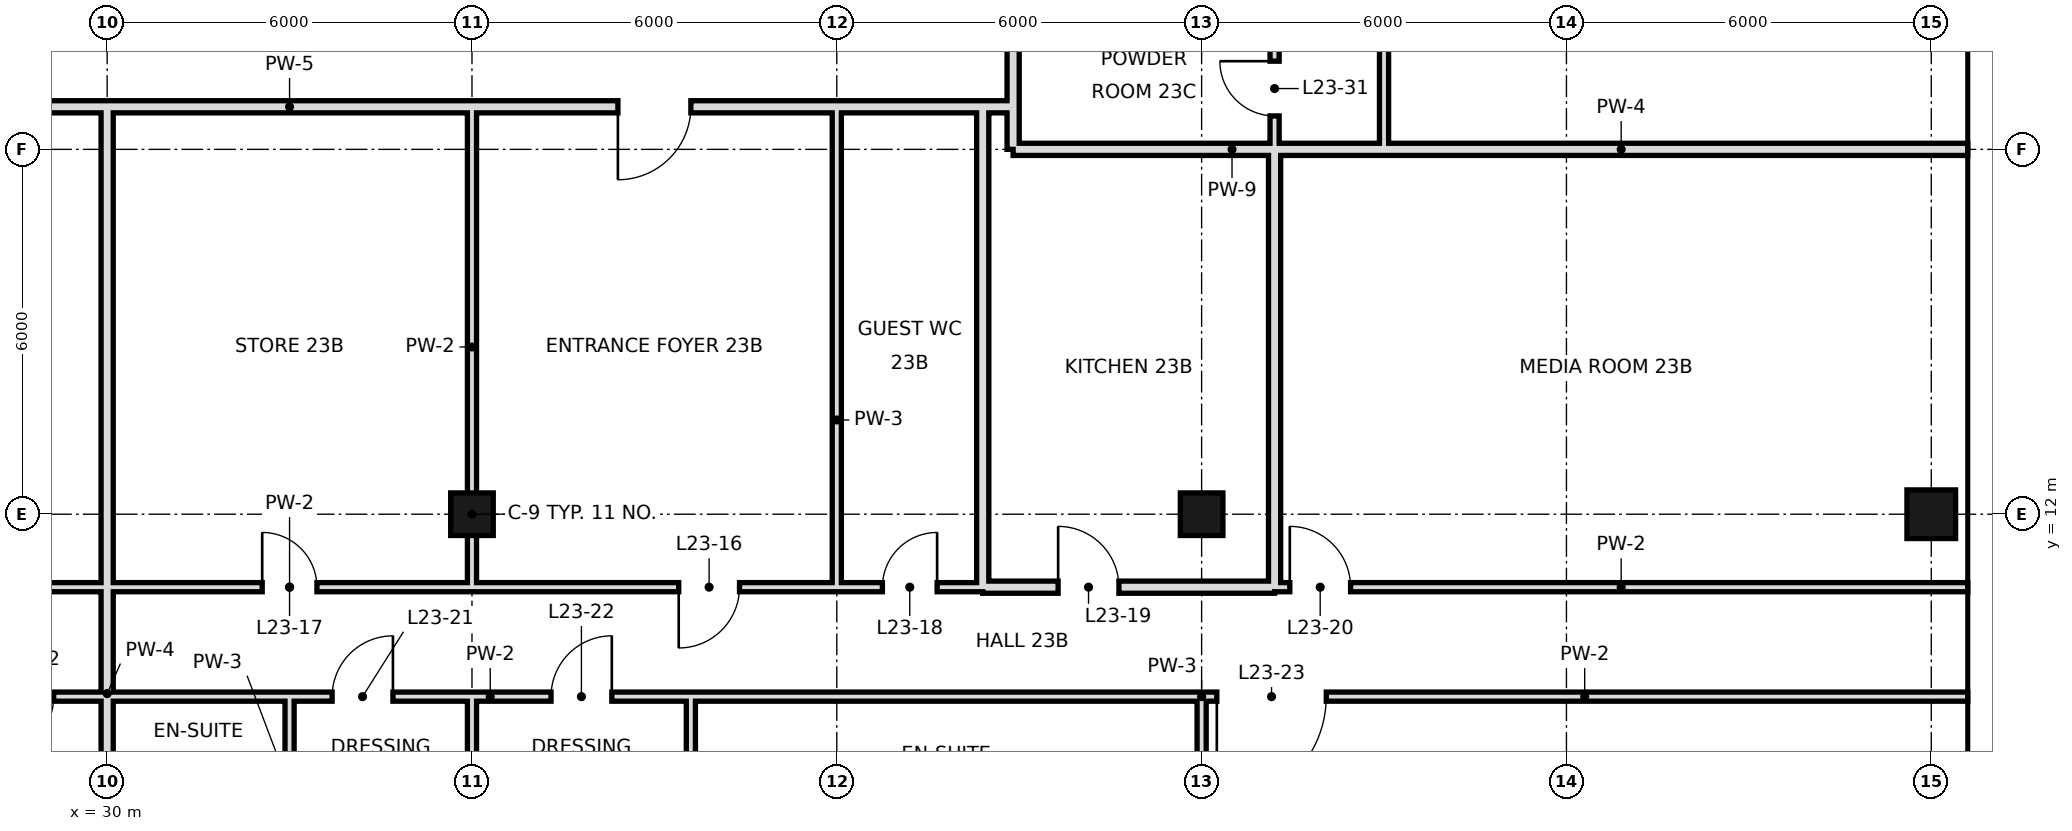
"""IFC4 building model, lengths in metres.
Left out: names, types, materials, properties, quantities, classifications, styles, units other than length and angle.
Written with IfcOpenShell. Run it as: python <this file> out.ifc"""

import sys

from ifc_helpers import new_model, si_unit, direction, frame, frame_2d, origin, origin_2d, place, context, subcontext, project, spatial, rectangle, hollow_rectangle, extrude, element, fill, save


model = new_model("IFC4")
c1 = context("Model", 3, precision=1e-05, world=origin(), true_north=direction((0.0, 1.0)))
c2 = subcontext(c1, "Body", "Model", "MODEL_VIEW")
j1 = project(units=[si_unit("LENGTHUNIT", "METRE"), si_unit("PLANEANGLEUNIT", "RADIAN")], contexts=[c1])
p1 = place(None, origin())
s1 = spatial("IfcSite", under=j1, at=p1, CompositionType="ELEMENT")
p2 = place(p1, origin())
s2 = spatial("IfcBuilding", under=s1, at=p2, CompositionType="ELEMENT")
p3 = place(p2, frame((0.0, 0.0, 107.0)))
s3 = spatial("IfcBuildingStorey", under=s2, at=p3, CompositionType="ELEMENT", Elevation=107.0)
for number, where, z_axis, x_axis in (
    (1, (36.0, 12.0, 0.0), (0.0, 0.0, 1.0), (1.0, 0.0, 0.0)),
    (2, (48.0, 12.0, 0.0), (0.0, 0.0, 1.0), (1.0, 0.0, 0.0)),
):
    element("IfcColumn", number, at=place(p3, frame(where, z_axis=z_axis, x_axis=x_axis)), inside=s3, PredefinedType="COLUMN", context=c2, shape_type="SweptSolid", body=[
        extrude(hollow_rectangle(XDim=0.7, YDim=0.7, WallThickness=0.036, at=origin_2d()), origin(), (0.0, 0.0, 1.0), 3.6),
    ])
p4 = place(p3, frame((60.0, 12.0, 0.0), z_axis=(0.0, 0.0, 1.0), x_axis=(1.0, 0.0, 0.0)))
e3 = element("IfcColumn", 3, at=p4, inside=s3, PredefinedType="COLUMN", context=c2, shape_type="SweptSolid", body=[
    extrude(hollow_rectangle(XDim=0.8, YDim=0.8, WallThickness=0.04, at=origin_2d()), origin(), (0.0, 0.0, 1.0), 3.6),
])
p5 = place(p3, frame((30.0, -0.6, 0.0), z_axis=(0.0, 0.0, 1.0), x_axis=(0.0, 1.0, 0.0)))
e4 = element("IfcWall", 4, at=p5, inside=s3, PredefinedType="SOLIDWALL", context=c2, shape_type="SweptSolid", body=[
    extrude(rectangle(XDim=19.3, YDim=0.2, at=frame_2d((9.65, 0.0))), origin(), (0.0, 0.0, 1.0), 2.72),
])
p6 = place(p3, frame((33.0, 6.0, 0.0), z_axis=(0.0, 0.0, 1.0), x_axis=(0.0, 1.0, 0.0)))
e5 = element("IfcWall", 5, at=p6, inside=s3, PredefinedType="PARTITIONING", context=c2, shape_type="SweptSolid", body=[
    extrude(rectangle(XDim=3.0, YDim=0.15, at=frame_2d((1.5, 0.0))), origin(), (0.0, 0.0, 1.0), 3.42),
])
p7 = place(p3, frame((36.0, 0.0, 0.0), z_axis=(0.0, 0.0, 1.0), x_axis=(0.0, 1.0, 0.0)))
e6 = element("IfcWall", 6, at=p7, inside=s3, PredefinedType="PARTITIONING", context=c2, shape_type="SweptSolid", body=[
    extrude(rectangle(XDim=9.0, YDim=0.15, at=frame_2d((4.5, 0.0))), origin(), (0.0, 0.0, 1.0), 2.72),
])
p8 = place(p3, frame((36.0, 10.8, 0.0), z_axis=(0.0, 0.0, 1.0), x_axis=(0.0, 1.0, 0.0)))
e7 = element("IfcWall", 7, at=p8, inside=s3, PredefinedType="PARTITIONING", context=c2, shape_type="SweptSolid", body=[
    extrude(rectangle(XDim=7.9, YDim=0.15, at=frame_2d((3.95, 0.0))), origin(), (0.0, 0.0, 1.0), 2.72),
])
p9 = place(p3, frame((39.6, 6.0, 0.0), z_axis=(0.0, 0.0, 1.0), x_axis=(0.0, 1.0, 0.0)))
e8 = element("IfcWall", 8, at=p9, inside=s3, PredefinedType="PARTITIONING", context=c2, shape_type="SweptSolid", body=[
    extrude(rectangle(XDim=3.0, YDim=0.15, at=frame_2d((1.5, 0.0))), origin(), (0.0, 0.0, 1.0), 3.42),
])
p10 = place(p3, frame((42.0, 10.8, 0.0), z_axis=(0.0, 0.0, 1.0), x_axis=(0.0, 1.0, 0.0)))
e9 = element("IfcWall", 9, at=p10, inside=s3, PredefinedType="PARTITIONING", context=c2, shape_type="SweptSolid", body=[
    extrude(rectangle(XDim=7.9, YDim=0.15, at=frame_2d((3.95, 0.0))), origin(), (0.0, 0.0, 1.0), 2.72),
])
p11 = place(p3, frame((44.4, 10.8, 0.0), z_axis=(0.0, 0.0, 1.0), x_axis=(0.0, 1.0, 0.0)))
e10 = element("IfcWall", 10, at=p11, inside=s3, PredefinedType="SOLIDWALL", context=c2, shape_type="SweptSolid", body=[
    extrude(rectangle(XDim=7.9, YDim=0.2, at=frame_2d((3.95, 0.0))), origin(), (0.0, 0.0, 1.0), 2.72),
])
p12 = place(p3, frame((44.9, 18.7, 0.0), z_axis=(0.0, 0.0, 1.0), x_axis=(0.0, 1.0, 0.0)))
e11 = element("IfcWall", 11, at=p12, inside=s3, PredefinedType="SOLIDWALL", context=c2, shape_type="SweptSolid", body=[
    extrude(rectangle(XDim=19.7, YDim=0.2, at=frame_2d((9.85, 0.0))), origin(), (0.0, 0.0, 1.0), 2.97),
])
p13 = place(p12, frame((16.96, 0.0, 0.0)))
e12 = element("IfcOpeningElement", 12, at=p13, cuts=e11, PredefinedType="OPENING", context=c2, shape_type="SweptSolid", body=[
    extrude(rectangle(XDim=1.2, YDim=2.4, at=frame_2d((0.6, 1.2))), frame((0.0, 0.11, 0.0), z_axis=(0.0, -1.0, 0.0), x_axis=(1.0, 0.0, 0.0)), (0.0, 0.0, 1.0), 0.22),
])
p14 = place(p3, frame((44.9, 18.0, 0.0), z_axis=(0.0, 0.0, 1.0), x_axis=(0.0, 1.0, 0.0)))
e13 = element("IfcWall", 13, at=p14, inside=s3, PredefinedType="SOLIDWALL", context=c2, shape_type="SweptSolid", body=[
    extrude(rectangle(XDim=0.7, YDim=0.2, at=frame_2d((0.35, 0.0))), origin(), (0.0, 0.0, 1.0), 2.97),
])
p15 = place(p3, frame((48.0, 6.0, 0.0), z_axis=(0.0, 0.0, 1.0), x_axis=(0.0, 1.0, 0.0)))
e14 = element("IfcWall", 14, at=p15, inside=s3, PredefinedType="PARTITIONING", context=c2, shape_type="SweptSolid", body=[
    extrude(rectangle(XDim=3.0, YDim=0.15, at=frame_2d((1.5, 0.0))), origin(), (0.0, 0.0, 1.0), 2.72),
])
p16 = place(p3, frame((49.2, 10.8, 0.0), z_axis=(0.0, 0.0, 1.0), x_axis=(0.0, 1.0, 0.0)))
e15 = element("IfcWall", 15, at=p16, inside=s3, PredefinedType="SOLIDWALL", context=c2, shape_type="SweptSolid", body=[
    extrude(rectangle(XDim=7.2, YDim=0.2, at=frame_2d((3.6, 0.0))), origin(), (0.0, 0.0, 1.0), 2.72),
])
p17 = place(p3, frame((49.2, 18.0, 0.0), z_axis=(0.0, 0.0, 1.0), x_axis=(0.0, 1.0, 0.0)))
e16 = element("IfcWall", 16, at=p17, inside=s3, PredefinedType="PARTITIONING", context=c2, shape_type="SweptSolid", body=[
    extrude(rectangle(XDim=2.4, YDim=0.15, at=frame_2d((1.2, 0.0))), origin(), (0.0, 0.0, 1.0), 3.42),
])
p18 = place(p17, frame((0.55, 0.0, 0.0)))
e17 = element("IfcOpeningElement", 17, at=p18, cuts=e16, PredefinedType="OPENING", context=c2, shape_type="SweptSolid", body=[
    extrude(rectangle(XDim=0.9, YDim=2.4, at=frame_2d((0.45, 1.2))), frame((0.0, 0.085, 0.0), z_axis=(0.0, -1.0, 0.0), x_axis=(1.0, 0.0, 0.0)), (0.0, 0.0, 1.0), 0.17),
])
p19 = place(p3, frame((51.0, 18.0, 0.0), z_axis=(0.0, 0.0, 1.0), x_axis=(0.0, 1.0, 0.0)))
e18 = element("IfcWall", 18, at=p19, inside=s3, PredefinedType="PARTITIONING", context=c2, shape_type="SweptSolid", body=[
    extrude(rectangle(XDim=8.4, YDim=0.15, at=frame_2d((4.2, 0.0))), origin(), (0.0, 0.0, 1.0), 3.42),
])
p20 = place(p19, frame((2.5, 0.0, 0.0)))
e19 = element("IfcOpeningElement", 19, at=p20, cuts=e18, PredefinedType="OPENING", context=c2, shape_type="SweptSolid", body=[
    extrude(rectangle(XDim=1.0, YDim=2.4, at=frame_2d((0.5, 1.2))), frame((0.0, 0.085, 0.0), z_axis=(0.0, -1.0, 0.0), x_axis=(1.0, 0.0, 0.0)), (0.0, 0.0, 1.0), 0.17),
])
p21 = place(p19, frame((6.52, 0.0, 0.0)))
e20 = element("IfcOpeningElement", 20, at=p21, cuts=e18, PredefinedType="OPENING", context=c2, shape_type="SweptSolid", body=[
    extrude(rectangle(XDim=1.0, YDim=2.4, at=frame_2d((0.5, 1.2))), frame((0.0, 0.085, 0.0), z_axis=(0.0, -1.0, 0.0), x_axis=(1.0, 0.0, 0.0)), (0.0, 0.0, 1.0), 0.17),
])
p22 = place(p3, frame((44.4, 10.8, 0.0), z_axis=(0.0, 0.0, 1.0), x_axis=(1.0, 0.0, 0.0)))
e21 = element("IfcWall", 21, at=p22, inside=s3, PredefinedType="SOLIDWALL", context=c2, shape_type="SweptSolid", body=[
    extrude(rectangle(XDim=4.8, YDim=0.2, at=frame_2d((2.4, 0.0))), origin(), (0.0, 0.0, 1.0), 2.72),
])
p23 = place(p22, frame((1.24, 0.0, 0.0)))
e22 = element("IfcOpeningElement", 22, at=p23, cuts=e21, PredefinedType="OPENING", context=c2, shape_type="SweptSolid", body=[
    extrude(rectangle(XDim=1.0, YDim=2.4, at=frame_2d((0.5, 1.2))), frame((0.0, 0.11, 0.0), z_axis=(0.0, -1.0, 0.0), x_axis=(1.0, 0.0, 0.0)), (0.0, 0.0, 1.0), 0.22),
])
p24 = place(p3, frame((24.0, 10.8, 0.0), z_axis=(0.0, 0.0, 1.0), x_axis=(1.0, 0.0, 0.0)))
e23 = element("IfcWall", 23, at=p24, inside=s3, PredefinedType="PARTITIONING", context=c2, shape_type="SweptSolid", body=[
    extrude(rectangle(XDim=18.0, YDim=0.15, at=frame_2d((9.0, 0.0))), origin(), (0.0, 0.0, 1.0), 3.42),
])
p25 = place(p24, frame((2.5, 0.0, 0.0)))
e24 = element("IfcOpeningElement", 24, at=p25, cuts=e23, PredefinedType="OPENING", context=c2, shape_type="SweptSolid", body=[
    extrude(rectangle(XDim=1.0, YDim=2.4, at=frame_2d((0.5, 1.2))), frame((0.0, 0.085, 0.0), z_axis=(0.0, -1.0, 0.0), x_axis=(1.0, 0.0, 0.0)), (0.0, 0.0, 1.0), 0.17),
])
p26 = place(p24, frame((15.4, 0.0, 0.0)))
e25 = element("IfcOpeningElement", 25, at=p26, cuts=e23, PredefinedType="OPENING", context=c2, shape_type="SweptSolid", body=[
    extrude(rectangle(XDim=1.0, YDim=2.4, at=frame_2d((0.5, 1.2))), frame((0.0, 0.085, 0.0), z_axis=(0.0, -1.0, 0.0), x_axis=(1.0, 0.0, 0.0)), (0.0, 0.0, 1.0), 0.17),
])
p27 = place(p24, frame((8.55, 0.0, 0.0)))
e26 = element("IfcOpeningElement", 26, at=p27, cuts=e23, PredefinedType="OPENING", context=c2, shape_type="SweptSolid", body=[
    extrude(rectangle(XDim=0.9, YDim=2.1, at=frame_2d((0.45, 1.05))), frame((0.0, 0.085, 0.0), z_axis=(0.0, -1.0, 0.0), x_axis=(1.0, 0.0, 0.0)), (0.0, 0.0, 1.0), 0.17),
])
p28 = place(p3, frame((49.2, 10.8, 0.0), z_axis=(0.0, 0.0, 1.0), x_axis=(1.0, 0.0, 0.0)))
e27 = element("IfcWall", 27, at=p28, inside=s3, PredefinedType="PARTITIONING", context=c2, shape_type="SweptSolid", body=[
    extrude(rectangle(XDim=11.4, YDim=0.15, at=frame_2d((5.7, 0.0))), origin(), (0.0, 0.0, 1.0), 3.42),
])
p29 = place(p28, frame((0.25, 0.0, 0.0)))
e28 = element("IfcOpeningElement", 28, at=p29, cuts=e27, PredefinedType="OPENING", context=c2, shape_type="SweptSolid", body=[
    extrude(rectangle(XDim=1.0, YDim=2.4, at=frame_2d((0.5, 1.2))), frame((0.0, 0.085, 0.0), z_axis=(0.0, -1.0, 0.0), x_axis=(1.0, 0.0, 0.0)), (0.0, 0.0, 1.0), 0.17),
])
p30 = place(p3, frame((42.0, 10.8, 0.0), z_axis=(0.0, 0.0, 1.0), x_axis=(1.0, 0.0, 0.0)))
e29 = element("IfcWall", 29, at=p30, inside=s3, PredefinedType="PARTITIONING", context=c2, shape_type="SweptSolid", body=[
    extrude(rectangle(XDim=2.4, YDim=0.15, at=frame_2d((1.2, 0.0))), origin(), (0.0, 0.0, 1.0), 3.42),
])
p31 = place(p30, frame((0.75, 0.0, 0.0)))
e30 = element("IfcOpeningElement", 30, at=p31, cuts=e29, PredefinedType="OPENING", context=c2, shape_type="SweptSolid", body=[
    extrude(rectangle(XDim=0.9, YDim=2.4, at=frame_2d((0.45, 1.2))), frame((0.0, 0.085, 0.0), z_axis=(0.0, -1.0, 0.0), x_axis=(1.0, 0.0, 0.0)), (0.0, 0.0, 1.0), 0.17),
])
p32 = place(p3, frame((44.9, 18.0, 0.0), z_axis=(0.0, 0.0, 1.0), x_axis=(1.0, 0.0, 0.0)))
e31 = element("IfcWall", 31, at=p32, inside=s3, PredefinedType="SOLIDWALL", context=c2, shape_type="SweptSolid", body=[
    extrude(rectangle(XDim=4.3, YDim=0.2, at=frame_2d((2.15, 0.0))), origin(), (0.0, 0.0, 1.0), 2.72),
])
p33 = place(p3, frame((49.2, 18.0, 0.0), z_axis=(0.0, 0.0, 1.0), x_axis=(1.0, 0.0, 0.0)))
e32 = element("IfcWall", 32, at=p33, inside=s3, PredefinedType="SOLIDWALL", context=c2, shape_type="SweptSolid", body=[
    extrude(rectangle(XDim=11.4, YDim=0.2, at=frame_2d((5.7, 0.0))), origin(), (0.0, 0.0, 1.0), 2.72),
])
p34 = place(p3, frame((21.6, 18.7, 0.0), z_axis=(0.0, 0.0, 1.0), x_axis=(1.0, 0.0, 0.0)))
e33 = element("IfcWall", 33, at=p34, inside=s3, PredefinedType="SOLIDWALL", context=c2, shape_type="SweptSolid", body=[
    extrude(rectangle(XDim=22.8, YDim=0.2, at=frame_2d((11.4, 0.0))), origin(), (0.0, 0.0, 1.0), 2.72),
])
p35 = place(p34, frame((4.8, 0.0, 0.0)))
e34 = element("IfcOpeningElement", 34, at=p35, cuts=e33, PredefinedType="OPENING", context=c2, shape_type="SweptSolid", body=[
    extrude(rectangle(XDim=1.2, YDim=2.4, at=frame_2d((0.6, 1.2))), frame((0.0, 0.11, 0.0), z_axis=(0.0, -1.0, 0.0), x_axis=(1.0, 0.0, 0.0)), (0.0, 0.0, 1.0), 0.22),
])
p36 = place(p34, frame((16.8, 0.0, 0.0)))
e35 = element("IfcOpeningElement", 35, at=p36, cuts=e33, PredefinedType="OPENING", context=c2, shape_type="SweptSolid", body=[
    extrude(rectangle(XDim=1.2, YDim=2.4, at=frame_2d((0.6, 1.2))), frame((0.0, 0.11, 0.0), z_axis=(0.0, -1.0, 0.0), x_axis=(1.0, 0.0, 0.0)), (0.0, 0.0, 1.0), 0.22),
])
p37 = place(p3, frame((44.4, 18.7, 0.0), z_axis=(0.0, 0.0, 1.0), x_axis=(1.0, 0.0, 0.0)))
e36 = element("IfcWall", 36, at=p37, inside=s3, PredefinedType="SOLIDWALL", context=c2, shape_type="SweptSolid", body=[
    extrude(rectangle(XDim=0.5, YDim=0.2, at=frame_2d((0.25, 0.0))), origin(), (0.0, 0.0, 1.0), 3.42),
])
p38 = place(p3, frame((26.4, 9.0, 0.0), z_axis=(0.0, 0.0, 1.0), x_axis=(1.0, 0.0, 0.0)))
e37 = element("IfcWall", 37, at=p38, inside=s3, PredefinedType="PARTITIONING", context=c2, shape_type="SweptSolid", body=[
    extrude(rectangle(XDim=3.6, YDim=0.15, at=frame_2d((1.8, 0.0))), origin(), (0.0, 0.0, 1.0), 3.42),
])
p39 = place(p38, frame((1.72, 0.0, 0.0)))
e38 = element("IfcOpeningElement", 38, at=p39, cuts=e37, PredefinedType="OPENING", context=c2, shape_type="SweptSolid", body=[
    extrude(rectangle(XDim=1.0, YDim=2.4, at=frame_2d((0.5, 1.2))), frame((0.0, 0.085, 0.0), z_axis=(0.0, -1.0, 0.0), x_axis=(1.0, 0.0, 0.0)), (0.0, 0.0, 1.0), 0.17),
])
p40 = place(p3, frame((33.0, 9.0, 0.0), z_axis=(0.0, 0.0, 1.0), x_axis=(1.0, 0.0, 0.0)))
e39 = element("IfcWall", 39, at=p40, inside=s3, PredefinedType="PARTITIONING", context=c2, shape_type="SweptSolid", body=[
    extrude(rectangle(XDim=6.6, YDim=0.15, at=frame_2d((3.3, 0.0))), origin(), (0.0, 0.0, 1.0), 3.42),
])
p41 = place(p40, frame((0.7, 0.0, 0.0)))
e40 = element("IfcOpeningElement", 40, at=p41, cuts=e39, PredefinedType="OPENING", context=c2, shape_type="SweptSolid", body=[
    extrude(rectangle(XDim=1.0, YDim=2.4, at=frame_2d((0.5, 1.2))), frame((0.0, 0.085, 0.0), z_axis=(0.0, -1.0, 0.0), x_axis=(1.0, 0.0, 0.0)), (0.0, 0.0, 1.0), 0.17),
])
p42 = place(p40, frame((4.3, 0.0, 0.0)))
e41 = element("IfcOpeningElement", 41, at=p42, cuts=e39, PredefinedType="OPENING", context=c2, shape_type="SweptSolid", body=[
    extrude(rectangle(XDim=1.0, YDim=2.4, at=frame_2d((0.5, 1.2))), frame((0.0, 0.085, 0.0), z_axis=(0.0, -1.0, 0.0), x_axis=(1.0, 0.0, 0.0)), (0.0, 0.0, 1.0), 0.17),
])
p43 = place(p3, frame((48.0, 9.0, 0.0), z_axis=(0.0, 0.0, 1.0), x_axis=(1.0, 0.0, 0.0)))
e42 = element("IfcWall", 42, at=p43, inside=s3, PredefinedType="PARTITIONING", context=c2, shape_type="SweptSolid", body=[
    extrude(rectangle(XDim=12.6, YDim=0.15, at=frame_2d((6.3, 0.0))), origin(), (0.0, 0.0, 1.0), 3.42),
])
p44 = place(p43, frame((0.25, 0.0, 0.0)))
e43 = element("IfcOpeningElement", 43, at=p44, cuts=e42, PredefinedType="OPENING", context=c2, shape_type="SweptSolid", body=[
    extrude(rectangle(XDim=1.8, YDim=2.4, at=frame_2d((0.9, 1.2))), frame((0.0, 0.085, 0.0), z_axis=(0.0, -1.0, 0.0), x_axis=(1.0, 0.0, 0.0)), (0.0, 0.0, 1.0), 0.17),
])
p45 = place(p3, frame((30.0, 9.0, 0.0), z_axis=(0.0, 0.0, 1.0), x_axis=(1.0, 0.0, 0.0)))
e44 = element("IfcWall", 44, at=p45, inside=s3, PredefinedType="PARTITIONING", context=c2, shape_type="SweptSolid", body=[
    extrude(rectangle(XDim=3.0, YDim=0.15, at=frame_2d((1.5, 0.0))), origin(), (0.0, 0.0, 1.0), 3.42),
])
p46 = place(p3, frame((39.6, 9.0, 0.0), z_axis=(0.0, 0.0, 1.0), x_axis=(1.0, 0.0, 0.0)))
e45 = element("IfcWall", 45, at=p46, inside=s3, PredefinedType="PARTITIONING", context=c2, shape_type="SweptSolid", body=[
    extrude(rectangle(XDim=8.4, YDim=0.15, at=frame_2d((4.2, 0.0))), origin(), (0.0, 0.0, 1.0), 3.42),
])
p47 = place(p39, frame((1.0, 0.0, 0.0), z_axis=(0.0, 0.0, 1.0), x_axis=(-1.0, 0.0, 0.0)))
e46 = element("IfcDoor", 46, at=p47, inside=s3, OperationType="SINGLE_SWING_RIGHT", PredefinedType="DOOR", context=c2, shape_type="SweptSolid", body=[
    extrude(rectangle(XDim=1.0, YDim=2.4, at=frame_2d((0.5, 1.2))), frame((0.0, 0.025, 0.0), z_axis=(0.0, -1.0, 0.0), x_axis=(1.0, 0.0, 0.0)), (0.0, 0.0, 1.0), 0.05),
])
fill(e38, e46)
p48 = place(p26, frame((1.0, 0.0, 0.0), z_axis=(0.0, 0.0, 1.0), x_axis=(-1.0, 0.0, 0.0)))
e47 = element("IfcDoor", 47, at=p48, inside=s3, OperationType="SINGLE_SWING_RIGHT", PredefinedType="DOOR", context=c2, shape_type="SweptSolid", body=[
    extrude(rectangle(XDim=1.0, YDim=2.4, at=frame_2d((0.5, 1.2))), frame((0.0, 0.025, 0.0), z_axis=(0.0, -1.0, 0.0), x_axis=(1.0, 0.0, 0.0)), (0.0, 0.0, 1.0), 0.05),
])
fill(e25, e47)
p49 = place(p27, origin())
e48 = element("IfcDoor", 48, at=p49, inside=s3, OperationType="SINGLE_SWING_LEFT", PredefinedType="DOOR", context=c2, shape_type="SweptSolid", body=[
    extrude(rectangle(XDim=0.9, YDim=2.1, at=frame_2d((0.45, 1.05))), frame((0.0, 0.025, 0.0), z_axis=(0.0, -1.0, 0.0), x_axis=(1.0, 0.0, 0.0)), (0.0, 0.0, 1.0), 0.05),
])
fill(e26, e48)
p50 = place(p31, frame((0.9, 0.0, 0.0), z_axis=(0.0, 0.0, 1.0), x_axis=(-1.0, 0.0, 0.0)))
e49 = element("IfcDoor", 49, at=p50, inside=s3, OperationType="SINGLE_SWING_LEFT", PredefinedType="DOOR", context=c2, shape_type="SweptSolid", body=[
    extrude(rectangle(XDim=0.9, YDim=2.4, at=frame_2d((0.45, 1.2))), frame((0.0, 0.025, 0.0), z_axis=(0.0, -1.0, 0.0), x_axis=(1.0, 0.0, 0.0)), (0.0, 0.0, 1.0), 0.05),
])
fill(e30, e49)
p51 = place(p23, origin())
e50 = element("IfcDoor", 50, at=p51, inside=s3, OperationType="SINGLE_SWING_LEFT", PredefinedType="DOOR", context=c2, shape_type="SweptSolid", body=[
    extrude(rectangle(XDim=1.0, YDim=2.4, at=frame_2d((0.5, 1.2))), frame((0.0, 0.025, 0.0), z_axis=(0.0, -1.0, 0.0), x_axis=(1.0, 0.0, 0.0)), (0.0, 0.0, 1.0), 0.05),
])
fill(e22, e50)
p52 = place(p29, origin())
e51 = element("IfcDoor", 51, at=p52, inside=s3, OperationType="SINGLE_SWING_LEFT", PredefinedType="DOOR", context=c2, shape_type="SweptSolid", body=[
    extrude(rectangle(XDim=1.0, YDim=2.4, at=frame_2d((0.5, 1.2))), frame((0.0, 0.025, 0.0), z_axis=(0.0, -1.0, 0.0), x_axis=(1.0, 0.0, 0.0)), (0.0, 0.0, 1.0), 0.05),
])
fill(e28, e51)
p53 = place(p41, frame((1.0, 0.0, 0.0), z_axis=(0.0, 0.0, 1.0), x_axis=(-1.0, 0.0, 0.0)))
e52 = element("IfcDoor", 52, at=p53, inside=s3, OperationType="SINGLE_SWING_LEFT", PredefinedType="DOOR", context=c2, shape_type="SweptSolid", body=[
    extrude(rectangle(XDim=1.0, YDim=2.4, at=frame_2d((0.5, 1.2))), frame((0.0, 0.025, 0.0), z_axis=(0.0, -1.0, 0.0), x_axis=(1.0, 0.0, 0.0)), (0.0, 0.0, 1.0), 0.05),
])
fill(e40, e52)
p54 = place(p42, frame((1.0, 0.0, 0.0), z_axis=(0.0, 0.0, 1.0), x_axis=(-1.0, 0.0, 0.0)))
e53 = element("IfcDoor", 53, at=p54, inside=s3, OperationType="SINGLE_SWING_LEFT", PredefinedType="DOOR", context=c2, shape_type="SweptSolid", body=[
    extrude(rectangle(XDim=1.0, YDim=2.4, at=frame_2d((0.5, 1.2))), frame((0.0, 0.025, 0.0), z_axis=(0.0, -1.0, 0.0), x_axis=(1.0, 0.0, 0.0)), (0.0, 0.0, 1.0), 0.05),
])
fill(e41, e53)
p55 = place(p44, frame((1.8, 0.0, 0.0), z_axis=(0.0, 0.0, 1.0), x_axis=(-1.0, 0.0, 0.0)))
e54 = element("IfcDoor", 54, at=p55, inside=s3, OperationType="SINGLE_SWING_RIGHT", PredefinedType="DOOR", context=c2, shape_type="SweptSolid", body=[
    extrude(rectangle(XDim=1.8, YDim=2.4, at=frame_2d((0.9, 1.2))), frame((0.0, 0.025, 0.0), z_axis=(0.0, -1.0, 0.0), x_axis=(1.0, 0.0, 0.0)), (0.0, 0.0, 1.0), 0.05),
])
fill(e43, e54)
p56 = place(p18, frame((0.9, 0.0, 0.0), z_axis=(0.0, 0.0, 1.0), x_axis=(-1.0, 0.0, 0.0)))
e55 = element("IfcDoor", 55, at=p56, inside=s3, OperationType="SINGLE_SWING_LEFT", PredefinedType="DOOR", context=c2, shape_type="SweptSolid", body=[
    extrude(rectangle(XDim=0.9, YDim=2.4, at=frame_2d((0.45, 1.2))), frame((0.0, 0.025, 0.0), z_axis=(0.0, -1.0, 0.0), x_axis=(1.0, 0.0, 0.0)), (0.0, 0.0, 1.0), 0.05),
])
fill(e17, e55)
p57 = place(p36, frame((1.2, 0.0, 0.0), z_axis=(0.0, 0.0, 1.0), x_axis=(-1.0, 0.0, 0.0)))
e56 = element("IfcDoor", 56, at=p57, inside=s3, OperationType="SINGLE_SWING_RIGHT", PredefinedType="DOOR", context=c2, shape_type="SweptSolid", body=[
    extrude(rectangle(XDim=1.2, YDim=2.4, at=frame_2d((0.6, 1.2))), frame((0.0, 0.025, 0.0), z_axis=(0.0, -1.0, 0.0), x_axis=(1.0, 0.0, 0.0)), (0.0, 0.0, 1.0), 0.05),
])
fill(e35, e56)
save(model, sys.argv[1])
